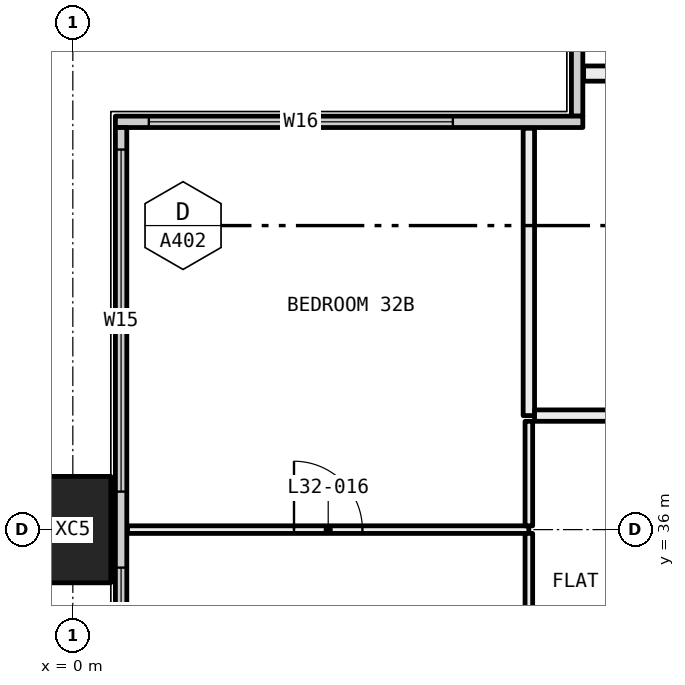
"""IFC4 building model, lengths in metres.
Left out: names, types, materials, properties, quantities, classifications, styles, units other than length and angle.
Written with IfcOpenShell. Run it as: python <this file> out.ifc"""

import sys

from ifc_helpers import new_model, si_unit, direction, frame, frame_2d, origin, origin_2d, place, context, subcontext, project, spatial, rectangle, hollow_rectangle, extrude, element, fill, save


model = new_model("IFC4")
c1 = context("Model", 3, precision=1e-05, world=origin(), true_north=direction((0.0, 1.0)))
c2 = subcontext(c1, "Body", "Model", "MODEL_VIEW")
j1 = project(units=[si_unit("LENGTHUNIT", "METRE"), si_unit("PLANEANGLEUNIT", "RADIAN")], contexts=[c1])
p1 = place(None, origin())
s1 = spatial("IfcSite", under=j1, at=p1, CompositionType="ELEMENT")
p2 = place(p1, origin())
s2 = spatial("IfcBuilding", under=s1, at=p2, CompositionType="ELEMENT")
p3 = place(p2, frame((0.0, 0.0, 124.2)))
s3 = spatial("IfcBuildingStorey", under=s2, at=p3, CompositionType="ELEMENT", Elevation=124.2)
p4 = place(p3, frame((0.0, 36.0, -0.4), z_axis=(0.0, 0.0, 1.0), x_axis=(0.0, 1.0, 0.0)))
e1 = element("IfcColumn", 1, at=p4, inside=s3, PredefinedType="COLUMN", context=c2, shape_type="SweptSolid", body=[
    extrude(hollow_rectangle(XDim=1.4, YDim=1.0, WallThickness=0.055, at=origin_2d()), origin(), (0.0, 0.0, 1.0), 3.45),
])
p5 = place(p3, frame((6.635, 41.44, 0.0), z_axis=(0.0, 0.0, 1.0), x_axis=(0.0, 1.0, 0.0)))
e2 = element("IfcWall", 2, at=p5, inside=s3, PredefinedType="ELEMENTEDWALL", context=c2, shape_type="SweptSolid", body=[
    extrude(rectangle(XDim=5.85, YDim=0.15, at=frame_2d((2.925, 0.0))), origin(), (0.0, 0.0, 1.0), 3.05),
])
p6 = place(p5, frame((1.56, 0.0, 0.45)))
e3 = element("IfcOpeningElement", 3, at=p6, cuts=e2, PredefinedType="OPENING", context=c2, shape_type="SweptSolid", body=[
    extrude(rectangle(XDim=4.0, YDim=2.55, at=frame_2d((2.0, 1.275))), frame((0.0, 0.085, 0.0), z_axis=(0.0, -1.0, 0.0), x_axis=(1.0, 0.0, 0.0)), (0.0, 0.0, 1.0), 0.17),
])
p7 = place(p3, frame((0.56, 41.365, 0.0), z_axis=(0.0, 0.0, 1.0), x_axis=(1.0, 0.0, 0.0)))
e4 = element("IfcWall", 4, at=p7, inside=s3, PredefinedType="ELEMENTEDWALL", context=c2, shape_type="SweptSolid", body=[
    extrude(rectangle(XDim=6.15, YDim=0.15, at=frame_2d((3.075, 0.0))), origin(), (0.0, 0.0, 1.0), 3.05),
])
p8 = place(p7, frame((0.44, 0.0, 0.45)))
e5 = element("IfcOpeningElement", 5, at=p8, cuts=e4, PredefinedType="OPENING", context=c2, shape_type="SweptSolid", body=[
    extrude(rectangle(XDim=4.0, YDim=2.55, at=frame_2d((2.0, 1.275))), frame((0.0, 0.085, 0.0), z_axis=(0.0, -1.0, 0.0), x_axis=(1.0, 0.0, 0.0)), (0.0, 0.0, 1.0), 0.17),
])
p9 = place(p3, frame((0.635, 18.71, 0.0), z_axis=(0.0, 0.0, 1.0), x_axis=(0.0, 1.0, 0.0)))
e6 = element("IfcWall", 6, at=p9, inside=s3, PredefinedType="ELEMENTEDWALL", context=c2, shape_type="SweptSolid", body=[
    extrude(rectangle(XDim=22.58, YDim=0.15, at=frame_2d((11.29, 0.0))), origin(), (0.0, 0.0, 1.0), 3.05),
])
p10 = place(p9, frame((0.29, 0.0, 0.45)))
e7 = element("IfcOpeningElement", 7, at=p10, cuts=e6, PredefinedType="OPENING", context=c2, shape_type="SweptSolid", body=[
    extrude(rectangle(XDim=4.5, YDim=2.55, at=frame_2d((2.25, 1.275))), frame((0.0, 0.085, 0.0), z_axis=(0.0, -1.0, 0.0), x_axis=(1.0, 0.0, 0.0)), (0.0, 0.0, 1.0), 0.17),
])
p11 = place(p9, frame((5.79, 0.0, 0.45)))
e8 = element("IfcOpeningElement", 8, at=p11, cuts=e6, PredefinedType="OPENING", context=c2, shape_type="SweptSolid", body=[
    extrude(rectangle(XDim=1.25, YDim=2.55, at=frame_2d((0.625, 1.275))), frame((0.0, 0.085, 0.0), z_axis=(0.0, -1.0, 0.0), x_axis=(1.0, 0.0, 0.0)), (0.0, 0.0, 1.0), 0.17),
])
p12 = place(p9, frame((10.04, 0.0, 0.45)))
e9 = element("IfcOpeningElement", 9, at=p12, cuts=e6, PredefinedType="OPENING", context=c2, shape_type="SweptSolid", body=[
    extrude(rectangle(XDim=0.75, YDim=2.55, at=frame_2d((0.375, 1.275))), frame((0.0, 0.085, 0.0), z_axis=(0.0, -1.0, 0.0), x_axis=(1.0, 0.0, 0.0)), (0.0, 0.0, 1.0), 0.17),
])
p13 = place(p9, frame((11.79, 0.0, 0.45)))
e10 = element("IfcOpeningElement", 10, at=p13, cuts=e6, PredefinedType="OPENING", context=c2, shape_type="SweptSolid", body=[
    extrude(rectangle(XDim=0.75, YDim=2.55, at=frame_2d((0.375, 1.275))), frame((0.0, 0.085, 0.0), z_axis=(0.0, -1.0, 0.0), x_axis=(1.0, 0.0, 0.0)), (0.0, 0.0, 1.0), 0.17),
])
p14 = place(p9, frame((15.54, 0.0, 0.45)))
e11 = element("IfcOpeningElement", 11, at=p14, cuts=e6, PredefinedType="OPENING", context=c2, shape_type="SweptSolid", body=[
    extrude(rectangle(XDim=1.25, YDim=2.55, at=frame_2d((0.625, 1.275))), frame((0.0, 0.085, 0.0), z_axis=(0.0, -1.0, 0.0), x_axis=(1.0, 0.0, 0.0)), (0.0, 0.0, 1.0), 0.17),
])
p15 = place(p9, frame((17.79, 0.0, 0.45)))
e12 = element("IfcOpeningElement", 12, at=p15, cuts=e6, PredefinedType="OPENING", context=c2, shape_type="SweptSolid", body=[
    extrude(rectangle(XDim=4.5, YDim=2.55, at=frame_2d((2.25, 1.275))), frame((0.0, 0.085, 0.0), z_axis=(0.0, -1.0, 0.0), x_axis=(1.0, 0.0, 0.0)), (0.0, 0.0, 1.0), 0.17),
])
p16 = place(p3, frame((6.0, 36.0, 0.0), z_axis=(0.0, 0.0, 1.0), x_axis=(-1.0, 0.0, 0.0)))
e13 = element("IfcWall", 13, at=p16, inside=s3, PredefinedType="PARTITIONING", context=c2, shape_type="SweptSolid", body=[
    extrude(rectangle(XDim=5.28, YDim=0.1, at=frame_2d((2.64, 0.0))), origin(), (0.0, 0.0, 1.0), 2.45),
])
p17 = place(p16, frame((2.19, 0.0, 0.0)))
e14 = element("IfcOpeningElement", 14, at=p17, cuts=e13, PredefinedType="OPENING", context=c2, shape_type="SweptSolid", body=[
    extrude(rectangle(XDim=0.9, YDim=2.1, at=frame_2d((0.45, 1.05))), frame((0.0, 0.06, 0.0), z_axis=(0.0, -1.0, 0.0), x_axis=(1.0, 0.0, 0.0)), (0.0, 0.0, 1.0), 0.12),
])
p18 = place(p3, frame((6.0, 33.0, 0.0), z_axis=(0.0, 0.0, 1.0), x_axis=(0.0, 1.0, 0.0)))
e15 = element("IfcWall", 15, at=p18, inside=s3, PredefinedType="PARTITIONING", context=c2, shape_type="SweptSolid", body=[
    extrude(rectangle(XDim=2.95, YDim=0.1, at=frame_2d((1.475, 0.0))), origin(), (0.0, 0.0, 1.0), 2.45),
])
p19 = place(p18, frame((1.025, 0.0, 0.0)))
e16 = element("IfcOpeningElement", 16, at=p19, cuts=e15, PredefinedType="OPENING", context=c2, shape_type="SweptSolid", body=[
    extrude(rectangle(XDim=0.9, YDim=2.1, at=frame_2d((0.45, 1.05))), frame((0.0, 0.06, 0.0), z_axis=(0.0, -1.0, 0.0), x_axis=(1.0, 0.0, 0.0)), (0.0, 0.0, 1.0), 0.12),
])
p20 = place(p3, frame((6.0, 36.05, 0.0), z_axis=(0.0, 0.0, 1.0), x_axis=(0.0, 1.0, 0.0)))
e17 = element("IfcWall", 17, at=p20, inside=s3, PredefinedType="PARTITIONING", context=c2, shape_type="SweptSolid", body=[
    extrude(rectangle(XDim=1.375, YDim=0.1, at=frame_2d((0.688, 0.0))), origin(), (0.0, 0.0, 1.0), 2.45),
])
p21 = place(p3, frame((6.0, 37.5, 0.0), z_axis=(0.0, 0.0, 1.0), x_axis=(0.0, 1.0, 0.0)))
e18 = element("IfcWall", 18, at=p21, inside=s3, PredefinedType="PARTITIONING", context=c2, shape_type="SweptSolid", body=[
    extrude(rectangle(XDim=3.78, YDim=0.15, at=frame_2d((1.89, 0.0))), origin(), (0.0, 0.0, 1.0), 3.05),
])
p22 = place(p3, frame((10.0, 37.5, 0.0), z_axis=(0.0, 0.0, 1.0), x_axis=(-1.0, 0.0, 0.0)))
e19 = element("IfcWall", 19, at=p22, inside=s3, PredefinedType="PARTITIONING", context=c2, shape_type="SweptSolid", body=[
    extrude(rectangle(XDim=3.925, YDim=0.15, at=frame_2d((1.962, 0.0))), origin(), (0.0, 0.0, 1.0), 3.05),
])
p23 = place(p22, frame((1.512, 0.0, 0.0)))
e20 = element("IfcOpeningElement", 20, at=p23, cuts=e19, PredefinedType="OPENING", context=c2, shape_type="SweptSolid", body=[
    extrude(rectangle(XDim=0.9, YDim=2.1, at=frame_2d((0.45, 1.05))), frame((0.0, 0.085, 0.0), z_axis=(0.0, -1.0, 0.0), x_axis=(1.0, 0.0, 0.0)), (0.0, 0.0, 1.0), 0.17),
])
p24 = place(p3, frame((10.1, 42.0, 0.0), z_axis=(0.0, 0.0, 1.0), x_axis=(-1.0, 0.0, 0.0)))
e21 = element("IfcWall", 21, at=p24, inside=s3, PredefinedType="PARTITIONING", context=c2, shape_type="SweptSolid", body=[
    extrude(rectangle(XDim=3.38, YDim=0.2, at=frame_2d((1.69, 0.0))), origin(), (0.0, 0.0, 1.0), 3.05),
])
p25 = place(p8, origin())
e22 = element("IfcWindow", 22, at=p25, inside=s3, PartitioningType="SINGLE_PANEL", PredefinedType="WINDOW", context=c2, shape_type="SweptSolid", body=[
    extrude(rectangle(XDim=4.0, YDim=2.55, at=frame_2d((2.0, 1.275))), frame((0.0, 0.03, 0.0), z_axis=(0.0, -1.0, 0.0), x_axis=(1.0, 0.0, 0.0)), (0.0, 0.0, 1.0), 0.06),
])
fill(e5, e22)
p26 = place(p14, origin())
e23 = element("IfcWindow", 23, at=p26, inside=s3, PartitioningType="SINGLE_PANEL", PredefinedType="WINDOW", context=c2, shape_type="SweptSolid", body=[
    extrude(rectangle(XDim=1.25, YDim=2.55, at=frame_2d((0.625, 1.275))), frame((0.0, 0.03, 0.0), z_axis=(0.0, -1.0, 0.0), x_axis=(1.0, 0.0, 0.0)), (0.0, 0.0, 1.0), 0.06),
])
fill(e11, e23)
p27 = place(p15, origin())
e24 = element("IfcWindow", 24, at=p27, inside=s3, PartitioningType="SINGLE_PANEL", PredefinedType="WINDOW", context=c2, shape_type="SweptSolid", body=[
    extrude(rectangle(XDim=4.5, YDim=2.55, at=frame_2d((2.25, 1.275))), frame((0.0, 0.03, 0.0), z_axis=(0.0, -1.0, 0.0), x_axis=(1.0, 0.0, 0.0)), (0.0, 0.0, 1.0), 0.06),
])
fill(e12, e24)
p28 = place(p17, frame((0.9, 0.0, 0.0), x_axis=(-1.0, 0.0, 0.0)))
e25 = element("IfcDoor", 25, at=p28, inside=s3, OperationType="SINGLE_SWING_RIGHT", PredefinedType="DOOR", context=c2, shape_type="SweptSolid", body=[
    extrude(rectangle(XDim=0.9, YDim=2.1, at=frame_2d((0.45, 1.05))), frame((0.0, 0.025, 0.0), z_axis=(0.0, -1.0, 0.0), x_axis=(1.0, 0.0, 0.0)), (0.0, 0.0, 1.0), 0.05),
])
fill(e14, e25)
save(model, sys.argv[1])
